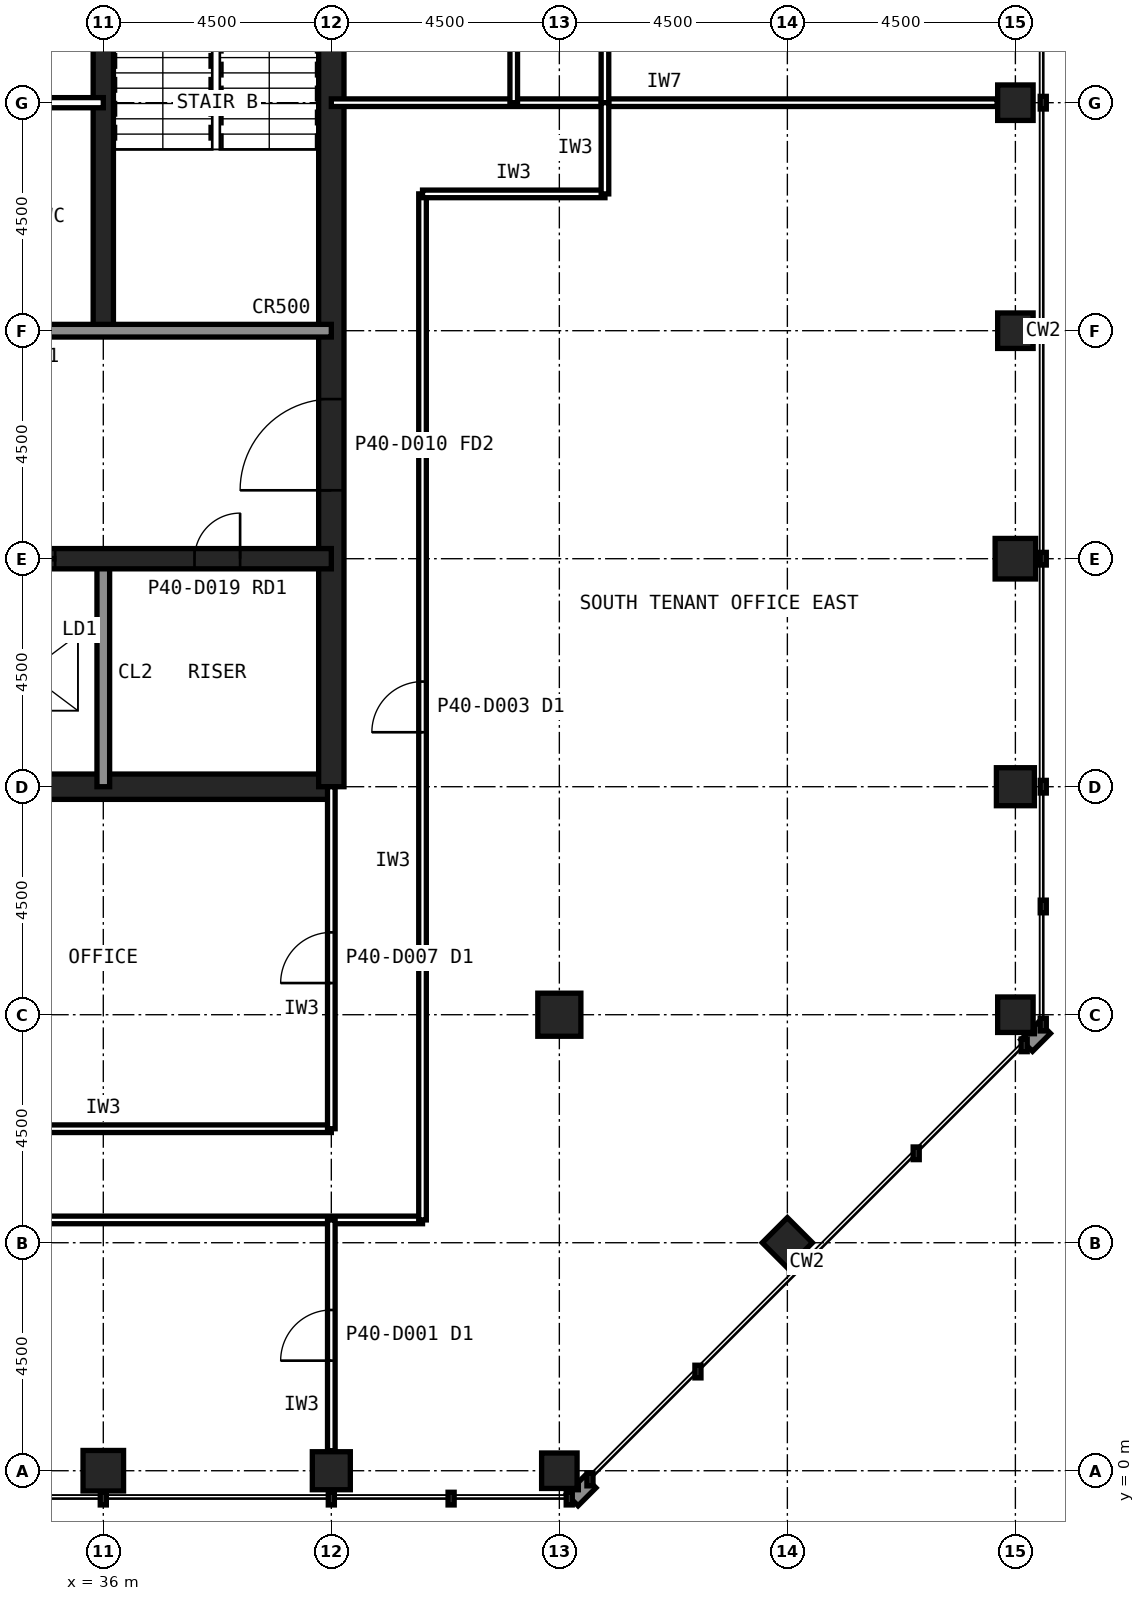
"""IFC4 building model, lengths in metres.
Left out: names, types, materials, properties, quantities, classifications, styles, units other than length and angle.
Written with IfcOpenShell. Run it as: python <this file> out.ifc"""

import sys

from ifc_helpers import new_model, si_unit, direction, frame, frame_2d, origin, origin_2d, place, context, subcontext, project, spatial, rectangle, hollow_rectangle, extrude, element, fill, save


model = new_model("IFC4")
c1 = context("Model", 3, precision=1e-05, world=origin(), true_north=direction((0.0, 1.0)))
c2 = subcontext(c1, "Body", "Model", "MODEL_VIEW")
j1 = project(units=[si_unit("LENGTHUNIT", "METRE"), si_unit("PLANEANGLEUNIT", "RADIAN")], contexts=[c1])
p1 = place(None, origin())
s1 = spatial("IfcSite", under=j1, at=p1, CompositionType="ELEMENT")
p2 = place(p1, origin())
s2 = spatial("IfcBuilding", under=s1, at=p2, CompositionType="ELEMENT")
p3 = place(p2, frame((0.0, 0.0, 167.6)))
s3 = spatial("IfcBuildingStorey", under=s2, at=p3, CompositionType="ELEMENT", Elevation=167.6)
p4 = place(p3, frame((36.0, 0.0, 0.0), z_axis=(0.0, 0.0, 1.0), x_axis=(1.0, 0.0, 0.0)))
e1 = element("IfcColumn", 1, at=p4, inside=s3, PredefinedType="COLUMN", context=c2, shape_type="SweptSolid", body=[
    extrude(hollow_rectangle(XDim=0.8, YDim=0.8, WallThickness=0.045, at=origin_2d()), origin(), (0.0, 0.0, 1.0), 4.0),
])
p5 = place(p3, frame((40.5, 0.0, 0.0), z_axis=(0.0, 0.0, 1.0), x_axis=(1.0, 0.0, 0.0)))
e2 = element("IfcColumn", 2, at=p5, inside=s3, PredefinedType="COLUMN", context=c2, shape_type="SweptSolid", body=[
    extrude(hollow_rectangle(XDim=0.75, YDim=0.75, WallThickness=0.04, at=origin_2d()), origin(), (0.0, 0.0, 1.0), 4.0),
])
for number, where, z_axis, x_axis in (
    (3, (45.0, 0.0, 0.0), (0.0, 0.0, 1.0), (1.0, 0.0, 0.0)),
    (4, (54.0, 9.0, 0.0), (0.0, 0.0, 1.0), (1.0, 0.0, 0.0)),
):
    element("IfcColumn", number, at=place(p3, frame(where, z_axis=z_axis, x_axis=x_axis)), inside=s3, PredefinedType="COLUMN", context=c2, shape_type="SweptSolid", body=[
        extrude(hollow_rectangle(XDim=0.7, YDim=0.7, WallThickness=0.036, at=origin_2d()), origin(), (0.0, 0.0, 1.0), 4.0),
    ])
p6 = place(p3, frame((54.0, 13.5, 0.0), z_axis=(0.0, 0.0, 1.0), x_axis=(1.0, 0.0, 0.0)))
e5 = element("IfcColumn", 5, at=p6, inside=s3, PredefinedType="COLUMN", context=c2, shape_type="SweptSolid", body=[
    extrude(hollow_rectangle(XDim=0.75, YDim=0.75, WallThickness=0.04, at=origin_2d()), origin(), (0.0, 0.0, 1.0), 4.0),
])
p7 = place(p3, frame((54.0, 18.0, 0.0), z_axis=(0.0, 0.0, 1.0), x_axis=(1.0, 0.0, 0.0)))
e6 = element("IfcColumn", 6, at=p7, inside=s3, PredefinedType="COLUMN", context=c2, shape_type="SweptSolid", body=[
    extrude(hollow_rectangle(XDim=0.8, YDim=0.8, WallThickness=0.045, at=origin_2d()), origin(), (0.0, 0.0, 1.0), 4.0),
])
for number, where, z_axis, x_axis in (
    (7, (54.0, 22.5, 0.0), (0.0, 0.0, 1.0), (1.0, 0.0, 0.0)),
    (8, (54.0, 27.0, 0.0), (0.0, 0.0, 1.0), (1.0, 0.0, 0.0)),
    (9, (49.5, 4.5, 0.0), (0.0, 0.0, 1.0), (0.707, 0.707, 0.0)),
):
    element("IfcColumn", number, at=place(p3, frame(where, z_axis=z_axis, x_axis=x_axis)), inside=s3, PredefinedType="COLUMN", context=c2, shape_type="SweptSolid", body=[
        extrude(hollow_rectangle(XDim=0.7, YDim=0.7, WallThickness=0.036, at=origin_2d()), origin(), (0.0, 0.0, 1.0), 4.0),
    ])
p8 = place(p3, frame((45.0, 9.0, 0.0), z_axis=(0.0, 0.0, 1.0), x_axis=(1.0, 0.0, 0.0)))
e10 = element("IfcColumn", 10, at=p8, inside=s3, PredefinedType="COLUMN", context=c2, shape_type="SweptSolid", body=[
    extrude(hollow_rectangle(XDim=0.85, YDim=0.85, WallThickness=0.05, at=origin_2d()), origin(), (0.0, 0.0, 1.0), 4.0),
])
p9 = place(p3, frame((13.5, 13.5, 0.0), z_axis=(0.0, 0.0, 1.0), x_axis=(1.0, 0.0, 0.0)))
e11 = element("IfcWall", 11, at=p9, inside=s3, PredefinedType="SHEAR", context=c2, shape_type="SweptSolid", body=[
    extrude(rectangle(XDim=27.0, YDim=0.5, at=frame_2d((13.5, 0.0))), origin(), (0.0, 0.0, 1.0), 4.0),
])
p10 = place(p3, frame((40.5, 13.5, 0.0), z_axis=(0.0, 0.0, 1.0), x_axis=(0.0, 1.0, 0.0)))
e12 = element("IfcWall", 12, at=p10, inside=s3, PredefinedType="SHEAR", context=c2, shape_type="SweptSolid", body=[
    extrude(rectangle(XDim=27.0, YDim=0.5, at=frame_2d((13.5, 0.0))), origin(), (0.0, 0.0, 1.0), 4.0),
])
p11 = place(p10, frame((5.85, 0.0, 0.0)))
e13 = element("IfcOpeningElement", 13, at=p11, cuts=e12, PredefinedType="OPENING", context=c2, shape_type="SweptSolid", body=[
    extrude(rectangle(XDim=1.8, YDim=2.1, at=frame_2d((0.9, 1.05))), frame((0.0, 0.26, 0.0), z_axis=(0.0, -1.0, 0.0), x_axis=(1.0, 0.0, 0.0)), (0.0, 0.0, 1.0), 0.52),
])
p12 = place(p10, frame((19.65, 0.0, 0.0)))
e14 = element("IfcOpeningElement", 14, at=p12, cuts=e12, PredefinedType="OPENING", context=c2, shape_type="SweptSolid", body=[
    extrude(rectangle(XDim=1.2, YDim=2.1, at=frame_2d((0.6, 1.05))), frame((0.0, 0.26, 0.0), z_axis=(0.0, -1.0, 0.0), x_axis=(1.0, 0.0, 0.0)), (0.0, 0.0, 1.0), 0.52),
])
p13 = place(p3, frame((36.0, 13.5, 0.0), z_axis=(0.0, 0.0, 1.0), x_axis=(0.0, 1.0, 0.0)))
e15 = element("IfcWall", 15, at=p13, inside=s3, PredefinedType="SOLIDWALL", context=c2, shape_type="SweptSolid", body=[
    extrude(rectangle(XDim=4.5, YDim=0.25, at=frame_2d((2.25, 0.0))), origin(), (0.0, 0.0, 1.0), 3.84),
])
p14 = place(p3, frame((36.0, 22.5, 0.0), z_axis=(0.0, 0.0, 1.0), x_axis=(0.0, 1.0, 0.0)))
e16 = element("IfcWall", 16, at=p14, inside=s3, PredefinedType="SHEAR", context=c2, shape_type="SweptSolid", body=[
    extrude(rectangle(XDim=18.0, YDim=0.4, at=frame_2d((9.0, 0.0))), origin(), (0.0, 0.0, 1.0), 4.0),
])
p15 = place(p3, frame((13.5, 18.0, 0.0), z_axis=(0.0, 0.0, 1.0), x_axis=(1.0, 0.0, 0.0)))
e17 = element("IfcWall", 17, at=p15, inside=s3, PredefinedType="SHEAR", context=c2, shape_type="SweptSolid", body=[
    extrude(rectangle(XDim=27.0, YDim=0.4, at=frame_2d((13.5, 0.0))), origin(), (0.0, 0.0, 1.0), 4.0),
])
p16 = place(p15, frame((24.3, 0.0, 0.0)))
e18 = element("IfcOpeningElement", 18, at=p16, cuts=e17, PredefinedType="OPENING", context=c2, shape_type="SweptSolid", body=[
    extrude(rectangle(XDim=0.9, YDim=2.1, at=frame_2d((0.45, 1.05))), frame((0.0, 0.21, 0.0), z_axis=(0.0, -1.0, 0.0), x_axis=(1.0, 0.0, 0.0)), (0.0, 0.0, 1.0), 0.42),
])
p17 = place(p15, frame((5.45, 0.0, 0.0)))
e19 = element("IfcOpeningElement", 19, at=p17, cuts=e17, PredefinedType="OPENING", context=c2, shape_type="SweptSolid", body=[
    extrude(rectangle(XDim=1.1, YDim=2.1, at=frame_2d((0.55, 1.05))), frame((0.0, 0.21, 0.0), z_axis=(0.0, -1.0, 0.0), x_axis=(1.0, 0.0, 0.0)), (0.0, 0.0, 1.0), 0.42),
])
p18 = place(p15, frame((8.45, 0.0, 0.0)))
e20 = element("IfcOpeningElement", 20, at=p18, cuts=e17, PredefinedType="OPENING", context=c2, shape_type="SweptSolid", body=[
    extrude(rectangle(XDim=1.1, YDim=2.1, at=frame_2d((0.55, 1.05))), frame((0.0, 0.21, 0.0), z_axis=(0.0, -1.0, 0.0), x_axis=(1.0, 0.0, 0.0)), (0.0, 0.0, 1.0), 0.42),
])
p19 = place(p15, frame((11.45, 0.0, 0.0)))
e21 = element("IfcOpeningElement", 21, at=p19, cuts=e17, PredefinedType="OPENING", context=c2, shape_type="SweptSolid", body=[
    extrude(rectangle(XDim=1.1, YDim=2.1, at=frame_2d((0.55, 1.05))), frame((0.0, 0.21, 0.0), z_axis=(0.0, -1.0, 0.0), x_axis=(1.0, 0.0, 0.0)), (0.0, 0.0, 1.0), 0.42),
])
p20 = place(p15, frame((14.45, 0.0, 0.0)))
e22 = element("IfcOpeningElement", 22, at=p20, cuts=e17, PredefinedType="OPENING", context=c2, shape_type="SweptSolid", body=[
    extrude(rectangle(XDim=1.1, YDim=2.1, at=frame_2d((0.55, 1.05))), frame((0.0, 0.21, 0.0), z_axis=(0.0, -1.0, 0.0), x_axis=(1.0, 0.0, 0.0)), (0.0, 0.0, 1.0), 0.42),
])
p21 = place(p15, frame((17.45, 0.0, 0.0)))
e23 = element("IfcOpeningElement", 23, at=p21, cuts=e17, PredefinedType="OPENING", context=c2, shape_type="SweptSolid", body=[
    extrude(rectangle(XDim=1.1, YDim=2.1, at=frame_2d((0.55, 1.05))), frame((0.0, 0.21, 0.0), z_axis=(0.0, -1.0, 0.0), x_axis=(1.0, 0.0, 0.0)), (0.0, 0.0, 1.0), 0.42),
])
p22 = place(p15, frame((20.45, 0.0, 0.0)))
e24 = element("IfcOpeningElement", 24, at=p22, cuts=e17, PredefinedType="OPENING", context=c2, shape_type="SweptSolid", body=[
    extrude(rectangle(XDim=1.1, YDim=2.1, at=frame_2d((0.55, 1.05))), frame((0.0, 0.21, 0.0), z_axis=(0.0, -1.0, 0.0), x_axis=(1.0, 0.0, 0.0)), (0.0, 0.0, 1.0), 0.42),
])
p23 = place(p15, frame((1.6, 0.0, 0.0)))
e25 = element("IfcOpeningElement", 25, at=p23, cuts=e17, PredefinedType="OPENING", context=c2, shape_type="SweptSolid", body=[
    extrude(rectangle(XDim=1.3, YDim=2.2, at=frame_2d((0.65, 1.1))), frame((0.0, 0.21, 0.0), z_axis=(0.0, -1.0, 0.0), x_axis=(1.0, 0.0, 0.0)), (0.0, 0.0, 1.0), 0.42),
])
p24 = place(p3, frame((13.5, 22.5, 0.0), z_axis=(0.0, 0.0, 1.0), x_axis=(1.0, 0.0, 0.0)))
e26 = element("IfcWall", 26, at=p24, inside=s3, PredefinedType="SOLIDWALL", context=c2, shape_type="SweptSolid", body=[
    extrude(rectangle(XDim=27.0, YDim=0.25, at=frame_2d((13.5, 0.0))), origin(), (0.0, 0.0, 1.0), 3.84),
])
p25 = place(p24, frame((1.65, 0.0, 0.0)))
e27 = element("IfcOpeningElement", 27, at=p25, cuts=e26, PredefinedType="OPENING", context=c2, shape_type="SweptSolid", body=[
    extrude(rectangle(XDim=1.2, YDim=2.1, at=frame_2d((0.6, 1.05))), frame((0.0, 0.135, 0.0), z_axis=(0.0, -1.0, 0.0), x_axis=(1.0, 0.0, 0.0)), (0.0, 0.0, 1.0), 0.27),
])
p26 = place(p24, frame((6.025, 0.0, 0.0)))
e28 = element("IfcOpeningElement", 28, at=p26, cuts=e26, PredefinedType="OPENING", context=c2, shape_type="SweptSolid", body=[
    extrude(rectangle(XDim=1.0, YDim=2.1, at=frame_2d((0.5, 1.05))), frame((0.0, 0.135, 0.0), z_axis=(0.0, -1.0, 0.0), x_axis=(1.0, 0.0, 0.0)), (0.0, 0.0, 1.0), 0.27),
])
p27 = place(p24, frame((10.525, 0.0, 0.0)))
e29 = element("IfcOpeningElement", 29, at=p27, cuts=e26, PredefinedType="OPENING", context=c2, shape_type="SweptSolid", body=[
    extrude(rectangle(XDim=1.0, YDim=2.1, at=frame_2d((0.5, 1.05))), frame((0.0, 0.135, 0.0), z_axis=(0.0, -1.0, 0.0), x_axis=(1.0, 0.0, 0.0)), (0.0, 0.0, 1.0), 0.27),
])
p28 = place(p24, frame((19.75, 0.0, 0.0)))
e30 = element("IfcOpeningElement", 30, at=p28, cuts=e26, PredefinedType="OPENING", context=c2, shape_type="SweptSolid", body=[
    extrude(rectangle(XDim=1.0, YDim=2.1, at=frame_2d((0.5, 1.05))), frame((0.0, 0.135, 0.0), z_axis=(0.0, -1.0, 0.0), x_axis=(1.0, 0.0, 0.0)), (0.0, 0.0, 1.0), 0.27),
])
p29 = place(p24, frame((15.05, 0.0, 0.0)))
e31 = element("IfcOpeningElement", 31, at=p29, cuts=e26, PredefinedType="OPENING", context=c2, shape_type="SweptSolid", body=[
    extrude(rectangle(XDim=1.4, YDim=2.4, at=frame_2d((0.7, 1.2))), frame((0.0, 0.135, 0.0), z_axis=(0.0, -1.0, 0.0), x_axis=(1.0, 0.0, 0.0)), (0.0, 0.0, 1.0), 0.27),
])
p30 = place(p3, frame((27.0, 27.0, 0.0), z_axis=(0.0, 0.0, 1.0), x_axis=(1.0, 0.0, 0.0)))
e32 = element("IfcWall", 32, at=p30, inside=s3, PredefinedType="PARTITIONING", context=c2, shape_type="SweptSolid", body=[
    extrude(rectangle(XDim=9.0, YDim=0.2, at=frame_2d((4.5, 0.0))), origin(), (0.0, 0.0, 1.0), 3.84),
])
p31 = place(p3, frame((40.5, 27.0, 0.0), z_axis=(0.0, 0.0, 1.0), x_axis=(1.0, 0.0, 0.0)))
e33 = element("IfcWall", 33, at=p31, inside=s3, PredefinedType="PARTITIONING", context=c2, shape_type="SweptSolid", body=[
    extrude(rectangle(XDim=13.14, YDim=0.15, at=frame_2d((6.57, 0.0))), origin(), (0.0, 0.0, 1.0), 2.989),
])
p32 = place(p3, frame((45.9, 27.0, 0.0), z_axis=(0.0, 0.0, 1.0), x_axis=(0.0, 1.0, 0.0)))
e34 = element("IfcWall", 34, at=p32, inside=s3, PredefinedType="PARTITIONING", context=c2, shape_type="SweptSolid", body=[
    extrude(rectangle(XDim=6.3, YDim=0.15, at=frame_2d((3.15, 0.0))), origin(), (0.0, 0.0, 1.0), 3.84),
])
p33 = place(p3, frame((12.315, 4.95, 0.0), z_axis=(0.0, 0.0, 1.0), x_axis=(1.0, 0.0, 0.0)))
e35 = element("IfcWall", 35, at=p33, inside=s3, PredefinedType="PARTITIONING", context=c2, shape_type="SweptSolid", body=[
    extrude(rectangle(XDim=29.985, YDim=0.15, at=frame_2d((14.993, 0.0))), origin(), (0.0, 0.0, 1.0), 3.84),
])
p34 = place(p33, frame((14.86, 0.0, 0.0)))
e36 = element("IfcOpeningElement", 36, at=p34, cuts=e35, PredefinedType="OPENING", context=c2, shape_type="SweptSolid", body=[
    extrude(rectangle(XDim=1.0, YDim=2.1, at=frame_2d((0.5, 1.05))), frame((0.0, 0.085, 0.0), z_axis=(0.0, -1.0, 0.0), x_axis=(1.0, 0.0, 0.0)), (0.0, 0.0, 1.0), 0.17),
])
p35 = place(p3, frame((42.3, 4.95, 0.0), z_axis=(0.0, 0.0, 1.0), x_axis=(0.0, 1.0, 0.0)))
e37 = element("IfcWall", 37, at=p35, inside=s3, PredefinedType="PARTITIONING", context=c2, shape_type="SweptSolid", body=[
    extrude(rectangle(XDim=20.25, YDim=0.15, at=frame_2d((10.125, 0.0))), origin(), (0.0, 0.0, 1.0), 3.84),
])
p36 = place(p35, frame((9.625, 0.0, 0.0)))
e38 = element("IfcOpeningElement", 38, at=p36, cuts=e37, PredefinedType="OPENING", context=c2, shape_type="SweptSolid", body=[
    extrude(rectangle(XDim=1.0, YDim=2.1, at=frame_2d((0.5, 1.05))), frame((0.0, 0.085, 0.0), z_axis=(0.0, -1.0, 0.0), x_axis=(1.0, 0.0, 0.0)), (0.0, 0.0, 1.0), 0.17),
])
p37 = place(p3, frame((42.3, 25.2, 0.0), z_axis=(0.0, 0.0, 1.0), x_axis=(1.0, 0.0, 0.0)))
e39 = element("IfcWall", 39, at=p37, inside=s3, PredefinedType="PARTITIONING", context=c2, shape_type="SweptSolid", body=[
    extrude(rectangle(XDim=3.6, YDim=0.15, at=frame_2d((1.8, 0.0))), origin(), (0.0, 0.0, 1.0), 3.84),
])
p38 = place(p3, frame((45.9, 25.2, 0.0), z_axis=(0.0, 0.0, 1.0), x_axis=(0.0, 1.0, 0.0)))
e40 = element("IfcWall", 40, at=p38, inside=s3, PredefinedType="PARTITIONING", context=c2, shape_type="SweptSolid", body=[
    extrude(rectangle(XDim=1.8, YDim=0.15, at=frame_2d((0.9, 0.0))), origin(), (0.0, 0.0, 1.0), 3.84),
])
p39 = place(p3, frame((31.5, 6.75, 0.0), z_axis=(0.0, 0.0, 1.0), x_axis=(1.0, 0.0, 0.0)))
e41 = element("IfcWall", 41, at=p39, inside=s3, PredefinedType="PARTITIONING", context=c2, shape_type="SweptSolid", body=[
    extrude(rectangle(XDim=9.0, YDim=0.15, at=frame_2d((4.5, 0.0))), origin(), (0.0, 0.0, 1.0), 3.84),
])
p40 = place(p3, frame((40.5, 6.75, 0.0), z_axis=(0.0, 0.0, 1.0), x_axis=(0.0, 1.0, 0.0)))
e42 = element("IfcWall", 42, at=p40, inside=s3, PredefinedType="PARTITIONING", context=c2, shape_type="SweptSolid", body=[
    extrude(rectangle(XDim=6.75, YDim=0.15, at=frame_2d((3.375, 0.0))), origin(), (0.0, 0.0, 1.0), 2.989),
])
p41 = place(p40, frame((2.875, 0.0, 0.0)))
e43 = element("IfcOpeningElement", 43, at=p41, cuts=e42, PredefinedType="OPENING", context=c2, shape_type="SweptSolid", body=[
    extrude(rectangle(XDim=1.0, YDim=2.1, at=frame_2d((0.5, 1.05))), frame((0.0, 0.085, 0.0), z_axis=(0.0, -1.0, 0.0), x_axis=(1.0, 0.0, 0.0)), (0.0, 0.0, 1.0), 0.17),
])
p42 = place(p3, frame((44.1, 27.0, 0.0), z_axis=(0.0, 0.0, 1.0), x_axis=(0.0, 1.0, 0.0)))
e44 = element("IfcWall", 44, at=p42, inside=s3, PredefinedType="PARTITIONING", context=c2, shape_type="SweptSolid", body=[
    extrude(rectangle(XDim=4.5, YDim=0.15, at=frame_2d((2.25, 0.0))), origin(), (0.0, 0.0, 1.0), 3.84),
])
p43 = place(p3, frame((40.5, 0.395, 0.0), z_axis=(0.0, 0.0, 1.0), x_axis=(0.0, 1.0, 0.0)))
e45 = element("IfcWall", 45, at=p43, inside=s3, PredefinedType="PARTITIONING", context=c2, shape_type="SweptSolid", body=[
    extrude(rectangle(XDim=4.555, YDim=0.15, at=frame_2d((2.277, 0.0))), origin(), (0.0, 0.0, 1.0), 2.989),
])
p44 = place(p43, frame((1.778, 0.0, 0.0)))
e46 = element("IfcOpeningElement", 46, at=p44, cuts=e45, PredefinedType="OPENING", context=c2, shape_type="SweptSolid", body=[
    extrude(rectangle(XDim=1.0, YDim=2.1, at=frame_2d((0.5, 1.05))), frame((0.0, 0.085, 0.0), z_axis=(0.0, -1.0, 0.0), x_axis=(1.0, 0.0, 0.0)), (0.0, 0.0, 1.0), 0.17),
])
p45 = place(p11, origin())
e47 = element("IfcDoor", 47, at=p45, inside=s3, OperationType="SINGLE_SWING_LEFT", PredefinedType="DOOR", context=c2, shape_type="SweptSolid", body=[
    extrude(rectangle(XDim=1.8, YDim=2.1, at=frame_2d((0.9, 1.05))), frame((0.0, 0.025, 0.0), z_axis=(0.0, -1.0, 0.0), x_axis=(1.0, 0.0, 0.0)), (0.0, 0.0, 1.0), 0.05),
])
fill(e13, e47)
p46 = place(p16, origin())
e48 = element("IfcDoor", 48, at=p46, inside=s3, OperationType="SINGLE_SWING_RIGHT", PredefinedType="DOOR", context=c2, shape_type="SweptSolid", body=[
    extrude(rectangle(XDim=0.9, YDim=2.1, at=frame_2d((0.45, 1.05))), frame((0.0, 0.025, 0.0), z_axis=(0.0, -1.0, 0.0), x_axis=(1.0, 0.0, 0.0)), (0.0, 0.0, 1.0), 0.05),
])
fill(e18, e48)
p47 = place(p22, origin())
e49 = element("IfcDoor", 49, at=p47, inside=s3, OperationType="SLIDING_TO_LEFT", PredefinedType="DOOR", context=c2, shape_type="SweptSolid", body=[
    extrude(rectangle(XDim=1.1, YDim=2.1, at=frame_2d((0.55, 1.05))), frame((0.0, 0.025, 0.0), z_axis=(0.0, -1.0, 0.0), x_axis=(1.0, 0.0, 0.0)), (0.0, 0.0, 1.0), 0.05),
])
fill(e24, e49)
p48 = place(p36, origin())
e50 = element("IfcDoor", 50, at=p48, inside=s3, OperationType="SINGLE_SWING_LEFT", PredefinedType="DOOR", context=c2, shape_type="SweptSolid", body=[
    extrude(rectangle(XDim=1.0, YDim=2.1, at=frame_2d((0.5, 1.05))), frame((0.0, 0.025, 0.0), z_axis=(0.0, -1.0, 0.0), x_axis=(1.0, 0.0, 0.0)), (0.0, 0.0, 1.0), 0.05),
])
fill(e38, e50)
p49 = place(p41, origin())
e51 = element("IfcDoor", 51, at=p49, inside=s3, OperationType="SINGLE_SWING_LEFT", PredefinedType="DOOR", context=c2, shape_type="SweptSolid", body=[
    extrude(rectangle(XDim=1.0, YDim=2.1, at=frame_2d((0.5, 1.05))), frame((0.0, 0.025, 0.0), z_axis=(0.0, -1.0, 0.0), x_axis=(1.0, 0.0, 0.0)), (0.0, 0.0, 1.0), 0.05),
])
fill(e43, e51)
p50 = place(p44, origin())
e52 = element("IfcDoor", 52, at=p50, inside=s3, OperationType="SINGLE_SWING_LEFT", PredefinedType="DOOR", context=c2, shape_type="SweptSolid", body=[
    extrude(rectangle(XDim=1.0, YDim=2.1, at=frame_2d((0.5, 1.05))), frame((0.0, 0.025, 0.0), z_axis=(0.0, -1.0, 0.0), x_axis=(1.0, 0.0, 0.0)), (0.0, 0.0, 1.0), 0.05),
])
fill(e46, e52)
save(model, sys.argv[1])
